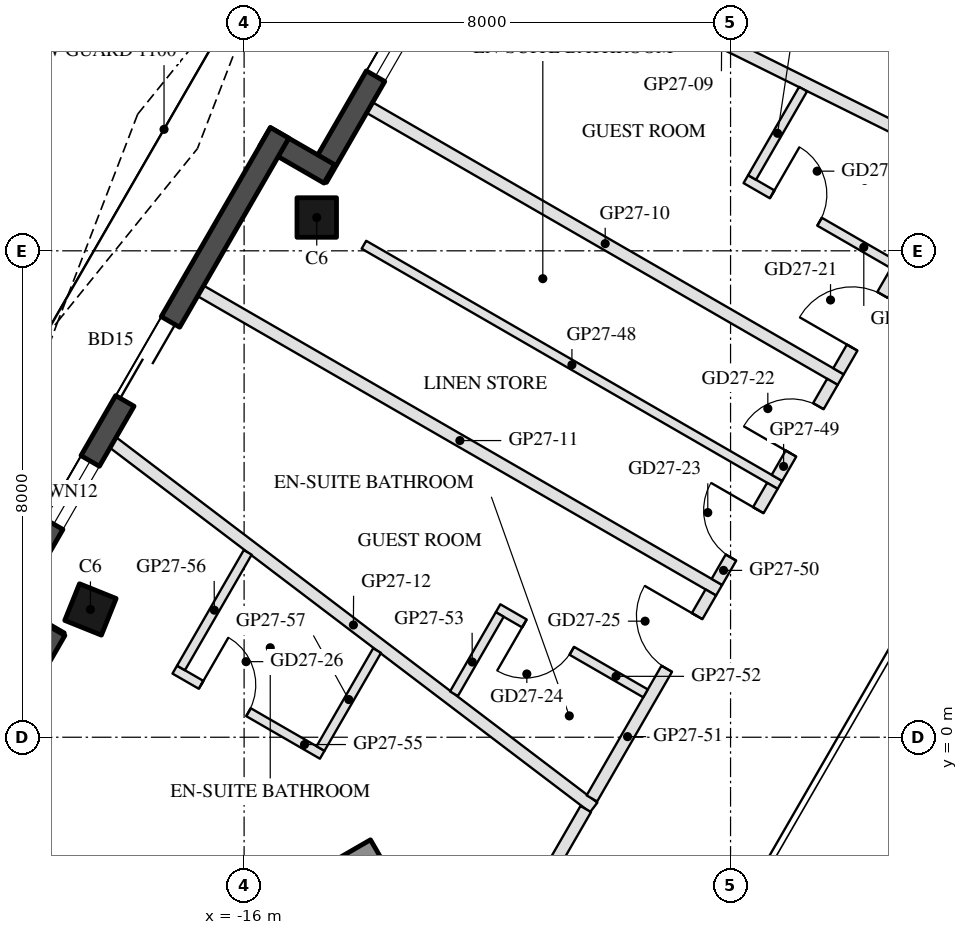
"""IFC4 building model, lengths in metres.
Left out: names, types, materials, properties, quantities, classifications, styles, units other than length and angle.
Written with IfcOpenShell. Run it as: python <this file> out.ifc"""

import sys

from ifc_helpers import new_model, si_unit, direction, frame, frame_2d, origin, origin_2d, place, context, subcontext, project, spatial, rectangle, hollow_rectangle, extrude, boolean, halfspace, element, fill, save


model = new_model("IFC4")
c1 = context("Model", 3, precision=1e-05, world=origin(), true_north=direction((0.0, 1.0)))
c2 = subcontext(c1, "Body", "Model", "MODEL_VIEW")
j1 = project(units=[si_unit("LENGTHUNIT", "METRE"), si_unit("PLANEANGLEUNIT", "RADIAN")], contexts=[c1])
p1 = place(None, origin())
s1 = spatial("IfcSite", under=j1, at=p1, CompositionType="ELEMENT")
p2 = place(p1, origin())
s2 = spatial("IfcBuilding", under=s1, at=p2, CompositionType="ELEMENT")
p3 = place(p2, frame((0.0, 0.0, 276.3)))
s3 = spatial("IfcBuildingStorey", under=s2, at=p3, CompositionType="ELEMENT", Elevation=276.3)
p4 = place(p3, frame((-14.805, 8.548, 0.0), z_axis=(0.131228839908, -0.075723997581, 0.988455799602), x_axis=(-0.499841813697, -0.866116713392, 7.933019e-06)))
e1 = element("IfcColumn", 1, at=p4, inside=s3, PredefinedType="COLUMN", context=c2, shape_type="SweptSolid", body=[
    boolean("DIFFERENCE", boolean("DIFFERENCE", extrude(hollow_rectangle(XDim=0.65, YDim=0.65, WallThickness=0.03, at=origin_2d()), origin(), (0.0, 0.0, 1.0), 3.743), halfspace(frame((0.0, 0.0, 0.037), z_axis=(0.0, 0.0, 1.0), x_axis=(1.0, 0.0, 0.0)), True)), halfspace(frame((0.0, 0.0, 3.706), z_axis=(0.0, 0.0, 1.0), x_axis=(1.0, 0.0, 0.0)), False)),
])
p5 = place(p3, frame((-18.527, 2.102, 0.0), z_axis=(0.16132511193, -0.02291623866, 0.98663521844), x_axis=(-0.495162384909, -0.866667980787, 0.060834395287)))
e2 = element("IfcColumn", 2, at=p5, inside=s3, PredefinedType="COLUMN", context=c2, shape_type="SweptSolid", body=[
    boolean("DIFFERENCE", boolean("DIFFERENCE", extrude(hollow_rectangle(XDim=0.65, YDim=0.65, WallThickness=0.03, at=origin_2d()), origin(), (0.0, 0.0, 1.0), 3.75), halfspace(frame((0.0, 0.0, 0.04), z_axis=(0.0, 0.0, 1.0), x_axis=(1.0, 0.0, 0.0)), True)), halfspace(frame((0.0, 0.0, 3.71), z_axis=(0.0, 0.0, 1.0), x_axis=(1.0, 0.0, 0.0)), False)),
])
p6 = place(p3, frame((-11.655, 14.655, 0.0), z_axis=(0.0, 0.0, 1.0), x_axis=(-0.499995993298, -0.866027717042, 0.0)))
e3 = element("IfcWall", 3, at=p6, inside=s3, PredefinedType="SOLIDWALL", context=c2, shape_type="SweptSolid", body=[
    extrude(rectangle(XDim=6.284, YDim=0.35, at=frame_2d((3.142, 0.0))), origin(), (0.0, 0.0, 1.0), 3.55),
])
p7 = place(p6, frame((1.767, 0.0, 0.0)))
e4 = element("IfcOpeningElement", 4, at=p7, cuts=e3, PredefinedType="OPENING", context=c2, shape_type="SweptSolid", body=[
    extrude(rectangle(XDim=1.5, YDim=2.4, at=frame_2d((0.75, 1.2))), frame((0.0, 0.185, 0.0), z_axis=(0.0, -1.0, 0.0), x_axis=(1.0, 0.0, 0.0)), (0.0, 0.0, 1.0), 0.37),
])
p8 = place(p6, frame((3.566, 0.0, 0.3)))
e5 = element("IfcOpeningElement", 5, at=p8, cuts=e3, PredefinedType="OPENING", context=c2, shape_type="SweptSolid", body=[
    extrude(rectangle(XDim=0.8, YDim=2.65, at=frame_2d((0.4, 1.325))), frame((0.0, 0.185, 0.0), z_axis=(0.0, -1.0, 0.0), x_axis=(1.0, 0.0, 0.0)), (0.0, 0.0, 1.0), 0.37),
])
p9 = place(p3, frame((-14.599, 9.266, 0.0), z_axis=(0.0, 0.0, 1.0), x_axis=(-0.866005645448, 0.500034220881, 0.0)))
e6 = element("IfcWall", 6, at=p9, inside=s3, PredefinedType="SOLIDWALL", context=c2, shape_type="SweptSolid", body=[
    extrude(rectangle(XDim=1.22, YDim=0.35, at=frame_2d((0.61, 0.0))), origin(), (0.0, 0.0, 1.0), 3.55),
])
p10 = place(p3, frame((-15.416, 9.94, 0.0), z_axis=(0.0, 0.0, 1.0), x_axis=(-0.500005190411, -0.866022407078, 0.0)))
e7 = element("IfcWall", 7, at=p10, inside=s3, PredefinedType="SOLIDWALL", context=c2, shape_type="SweptSolid", body=[
    extrude(rectangle(XDim=9.244, YDim=0.35, at=frame_2d((4.622, 0.0))), origin(), (0.0, 0.0, 1.0), 3.55),
])
p11 = place(p10, frame((3.59, 0.0, 0.0)))
e8 = element("IfcOpeningElement", 8, at=p11, cuts=e7, PredefinedType="OPENING", context=c2, shape_type="SweptSolid", body=[
    extrude(rectangle(XDim=1.5, YDim=2.4, at=frame_2d((0.75, 1.2))), frame((0.0, 0.185, 0.0), z_axis=(0.0, -1.0, 0.0), x_axis=(1.0, 0.0, 0.0)), (0.0, 0.0, 1.0), 0.37),
])
p12 = place(p10, frame((6.23, 0.0, 0.3)))
e9 = element("IfcOpeningElement", 9, at=p12, cuts=e7, PredefinedType="OPENING", context=c2, shape_type="SweptSolid", body=[
    extrude(rectangle(XDim=1.2, YDim=2.65, at=frame_2d((0.6, 1.325))), frame((0.0, 0.185, 0.0), z_axis=(0.0, -1.0, 0.0), x_axis=(1.0, 0.0, 0.0)), (0.0, 0.0, 1.0), 0.37),
])
p13 = place(p3, frame((-20.102, 2.174, 0.0), z_axis=(0.0, 0.0, 1.0), x_axis=(0.866092288191, -0.499884134912, 0.0)))
e10 = element("IfcWall", 10, at=p13, inside=s3, PredefinedType="SOLIDWALL", context=c2, shape_type="SweptSolid", body=[
    extrude(rectangle(XDim=1.22, YDim=0.35, at=frame_2d((0.61, 0.0))), origin(), (0.0, 0.0, 1.0), 3.55),
])
p14 = place(p3, frame((-19.099, 1.762, 0.0), z_axis=(0.0, 0.0, 1.0), x_axis=(-0.500012817413, -0.866018003521, 0.0)))
e11 = element("IfcWall", 11, at=p14, inside=s3, PredefinedType="SOLIDWALL", context=c2, shape_type="SweptSolid", body=[
    extrude(rectangle(XDim=6.283, YDim=0.35, at=frame_2d((3.142, 0.0))), origin(), (0.0, 0.0, 1.0), 3.55),
])
p15 = place(p14, frame((0.77, 0.0, 0.0)))
e12 = element("IfcOpeningElement", 12, at=p15, cuts=e11, PredefinedType="OPENING", context=c2, shape_type="SweptSolid", body=[
    extrude(rectangle(XDim=2.4, YDim=2.4, at=frame_2d((1.2, 1.2))), frame((0.0, 0.185, 0.0), z_axis=(0.0, -1.0, 0.0), x_axis=(1.0, 0.0, 0.0)), (0.0, 0.0, 1.0), 0.37),
])
p16 = place(p14, frame((3.47, 0.0, 0.3)))
e13 = element("IfcOpeningElement", 13, at=p16, cuts=e11, PredefinedType="OPENING", context=c2, shape_type="SweptSolid", body=[
    extrude(rectangle(XDim=2.4, YDim=2.65, at=frame_2d((1.2, 1.325))), frame((0.0, 0.185, 0.0), z_axis=(0.0, -1.0, 0.0), x_axis=(1.0, 0.0, 0.0)), (0.0, 0.0, 1.0), 0.37),
])
p17 = place(p3, frame((-13.797, -1.903, 0.0), z_axis=(0.0, 0.0, 1.0), x_axis=(-0.866022106474, -0.500005711065, 0.0)))
e14 = element("IfcWall", 14, at=p17, inside=s3, PredefinedType="SHEAR", context=c2, shape_type="SweptSolid", body=[
    extrude(rectangle(XDim=13.031, YDim=0.5, at=frame_2d((6.516, 0.0))), origin(), (0.0, 0.0, 1.0), 3.5),
])
p18 = place(p3, frame((-12.162, 13.427, 0.0), z_axis=(0.0, 0.0, 1.0), x_axis=(0.895849808174, -0.444356974959, 0.0)))
e15 = element("IfcWall", 15, at=p18, inside=s3, PredefinedType="PARTITIONING", context=c2, shape_type="SweptSolid", body=[
    extrude(rectangle(XDim=8.964, YDim=0.2, at=frame_2d((4.482, 0.0))), origin(), (0.0, 0.0, 1.0), 3.1),
])
p19 = place(p3, frame((-13.935, 10.355, 0.0), z_axis=(0.0, 0.0, 1.0), x_axis=(0.866026066645, -0.499998851889, 0.0)))
e16 = element("IfcWall", 16, at=p19, inside=s3, PredefinedType="PARTITIONING", context=c2, shape_type="SweptSolid", body=[
    extrude(rectangle(XDim=8.946, YDim=0.2, at=frame_2d((4.473, 0.0))), origin(), (0.0, 0.0, 1.0), 3.1),
])
p20 = place(p3, frame((-16.715, 7.341, 0.0), z_axis=(0.0, 0.0, 1.0), x_axis=(0.866024954444, -0.500000778279, 0.0)))
e17 = element("IfcWall", 17, at=p20, inside=s3, PredefinedType="PARTITIONING", context=c2, shape_type="SweptSolid", body=[
    extrude(rectangle(XDim=9.846, YDim=0.2, at=frame_2d((4.923, 0.0))), origin(), (0.0, 0.0, 1.0), 3.1),
])
p21 = place(p3, frame((-18.155, 4.847, 0.0), z_axis=(0.0, 0.0, 1.0), x_axis=(0.796434687651, -0.604724555733, 0.0)))
e18 = element("IfcWall", 18, at=p21, inside=s3, PredefinedType="PARTITIONING", context=c2, shape_type="SweptSolid", body=[
    extrude(rectangle(XDim=9.924, YDim=0.2, at=frame_2d((4.962, 0.0))), origin(), (0.0, 0.0, 1.0), 3.1),
])
p22 = place(p3, frame((-6.225, 6.019, 0.0), z_axis=(0.0, 0.0, 1.0), x_axis=(0.500011000363, 0.866019052629, 0.0)))
e19 = element("IfcWall", 19, at=p22, inside=s3, PredefinedType="PARTITIONING", context=c2, shape_type="SweptSolid", body=[
    extrude(rectangle(XDim=3.906, YDim=0.2, at=frame_2d((1.953, 0.0))), origin(), (0.0, 0.0, 1.0), 3.05),
])
p23 = place(p22, frame((0.45, 0.0, 0.0)))
e20 = element("IfcOpeningElement", 20, at=p23, cuts=e19, PredefinedType="OPENING", context=c2, shape_type="SweptSolid", body=[
    extrude(rectangle(XDim=1.0, YDim=2.1, at=frame_2d((0.5, 1.05))), frame((0.0, 0.11, 0.0), z_axis=(0.0, -1.0, 0.0), x_axis=(1.0, 0.0, 0.0)), (0.0, 0.0, 1.0), 0.22),
])
p24 = place(p3, frame((-7.749, 9.179, 0.0), z_axis=(0.0, 0.0, 1.0), x_axis=(0.866018616679, -0.500011755427, 0.0)))
e21 = element("IfcWall", 21, at=p24, inside=s3, PredefinedType="PARTITIONING", context=c2, shape_type="SweptSolid", body=[
    extrude(rectangle(XDim=2.8, YDim=0.15, at=frame_2d((1.4, 0.0))), origin(), (0.0, 0.0, 1.0), 3.55),
])
p25 = place(p24, frame((0.5, 0.0, 0.0)))
e22 = element("IfcOpeningElement", 22, at=p25, cuts=e21, PredefinedType="OPENING", context=c2, shape_type="SweptSolid", body=[
    extrude(rectangle(XDim=0.9, YDim=2.1, at=frame_2d((0.45, 1.05))), frame((0.0, 0.085, 0.0), z_axis=(0.0, -1.0, 0.0), x_axis=(1.0, 0.0, 0.0)), (0.0, 0.0, 1.0), 0.17),
])
p26 = place(p3, frame((-6.807, 10.659, 0.0), z_axis=(0.0, 0.0, 1.0), x_axis=(-0.500020578564, -0.866013522419, 0.0)))
e23 = element("IfcWall", 23, at=p26, inside=s3, PredefinedType="PARTITIONING", context=c2, shape_type="SweptSolid", body=[
    extrude(rectangle(XDim=1.678, YDim=0.15, at=frame_2d((0.839, 0.0))), origin(), (0.0, 0.0, 1.0), 3.55),
])
p27 = place(p3, frame((-14.03, 8.1, 0.0), z_axis=(0.0, 0.0, 1.0), x_axis=(0.866013180616, -0.500021170551, 0.0)))
e24 = element("IfcWall", 24, at=p27, inside=s3, PredefinedType="PARTITIONING", context=c2, shape_type="SweptSolid", body=[
    extrude(rectangle(XDim=7.9, YDim=0.15, at=frame_2d((3.95, 0.0))), origin(), (0.0, 0.0, 1.0), 3.05),
])
p28 = place(p3, frame((-7.237, 4.265, 0.0), z_axis=(0.0, 0.0, 1.0), x_axis=(0.499923179218, 0.866069751741, 0.0)))
e25 = element("IfcWall", 25, at=p28, inside=s3, PredefinedType="PARTITIONING", context=c2, shape_type="SweptSolid", body=[
    extrude(rectangle(XDim=1.825, YDim=0.2, at=frame_2d((0.913, 0.0))), origin(), (0.0, 0.0, 1.0), 3.05),
])
p29 = place(p28, frame((0.462, 0.0, 0.0)))
e26 = element("IfcOpeningElement", 26, at=p29, cuts=e25, PredefinedType="OPENING", context=c2, shape_type="SweptSolid", body=[
    extrude(rectangle(XDim=0.9, YDim=2.1, at=frame_2d((0.45, 1.05))), frame((0.0, 0.11, 0.0), z_axis=(0.0, -1.0, 0.0), x_axis=(1.0, 0.0, 0.0)), (0.0, 0.0, 1.0), 0.22),
])
p30 = place(p3, frame((-8.225, 2.555, 0.0), z_axis=(0.0, 0.0, 1.0), x_axis=(0.500081442387, 0.865978377894, 0.0)))
e27 = element("IfcWall", 27, at=p30, inside=s3, PredefinedType="PARTITIONING", context=c2, shape_type="SweptSolid", body=[
    extrude(rectangle(XDim=1.825, YDim=0.2, at=frame_2d((0.913, 0.0))), origin(), (0.0, 0.0, 1.0), 3.05),
])
p31 = place(p30, frame((0.462, 0.0, 0.0)))
e28 = element("IfcOpeningElement", 28, at=p31, cuts=e27, PredefinedType="OPENING", context=c2, shape_type="SweptSolid", body=[
    extrude(rectangle(XDim=0.9, YDim=2.1, at=frame_2d((0.45, 1.05))), frame((0.0, 0.11, 0.0), z_axis=(0.0, -1.0, 0.0), x_axis=(1.0, 0.0, 0.0)), (0.0, 0.0, 1.0), 0.22),
])
p32 = place(p3, frame((-10.281, -1.006, 0.0), z_axis=(0.0, 0.0, 1.0), x_axis=(0.499985379744, 0.866033844629, 0.0)))
e29 = element("IfcWall", 29, at=p32, inside=s3, PredefinedType="PARTITIONING", context=c2, shape_type="SweptSolid", body=[
    extrude(rectangle(XDim=3.912, YDim=0.2, at=frame_2d((1.956, 0.0))), origin(), (0.0, 0.0, 1.0), 3.05),
])
p33 = place(p32, frame((2.462, 0.0, 0.0)))
e30 = element("IfcOpeningElement", 30, at=p33, cuts=e29, PredefinedType="OPENING", context=c2, shape_type="SweptSolid", body=[
    extrude(rectangle(XDim=1.0, YDim=2.1, at=frame_2d((0.5, 1.05))), frame((0.0, 0.11, 0.0), z_axis=(0.0, -1.0, 0.0), x_axis=(1.0, 0.0, 0.0)), (0.0, 0.0, 1.0), 0.22),
])
p34 = place(p3, frame((-9.398, 0.722, 0.0), z_axis=(0.0, 0.0, 1.0), x_axis=(-0.866056369097, 0.49994636267, 0.0)))
e31 = element("IfcWall", 31, at=p34, inside=s3, PredefinedType="PARTITIONING", context=c2, shape_type="SweptSolid", body=[
    extrude(rectangle(XDim=2.8, YDim=0.15, at=frame_2d((1.4, 0.0))), origin(), (0.0, 0.0, 1.0), 3.55),
])
p35 = place(p34, frame((1.4, 0.0, 0.0)))
e32 = element("IfcOpeningElement", 32, at=p35, cuts=e31, PredefinedType="OPENING", context=c2, shape_type="SweptSolid", body=[
    extrude(rectangle(XDim=0.9, YDim=2.1, at=frame_2d((0.45, 1.05))), frame((0.0, 0.085, 0.0), z_axis=(0.0, -1.0, 0.0), x_axis=(1.0, 0.0, 0.0)), (0.0, 0.0, 1.0), 0.17),
])
p36 = place(p3, frame((-11.796, 2.019, 0.0), z_axis=(0.0, 0.0, 1.0), x_axis=(-0.499993865112, -0.866028945735, 0.0)))
e33 = element("IfcWall", 33, at=p36, inside=s3, PredefinedType="PARTITIONING", context=c2, shape_type="SweptSolid", body=[
    extrude(rectangle(XDim=1.505, YDim=0.15, at=frame_2d((0.753, 0.0))), origin(), (0.0, 0.0, 1.0), 3.55),
])
p37 = place(p3, frame((-12.269, -4.45, 0.0), z_axis=(0.0, 0.0, 1.0), x_axis=(0.500013576925, 0.866017565001, 0.0)))
e34 = element("IfcWall", 34, at=p37, inside=s3, PredefinedType="PARTITIONING", context=c2, shape_type="SweptSolid", body=[
    extrude(rectangle(XDim=3.775, YDim=0.2, at=frame_2d((1.887, 0.0))), origin(), (0.0, 0.0, 1.0), 3.05),
])
p38 = place(p37, frame((0.8, 0.0, 0.0)))
e35 = element("IfcOpeningElement", 35, at=p38, cuts=e34, PredefinedType="OPENING", context=c2, shape_type="SweptSolid", body=[
    extrude(rectangle(XDim=1.0, YDim=2.1, at=frame_2d((0.5, 1.05))), frame((0.0, 0.11, 0.0), z_axis=(0.0, -1.0, 0.0), x_axis=(1.0, 0.0, 0.0)), (0.0, 0.0, 1.0), 0.22),
])
p39 = place(p3, frame((-17.14, 1.112, 0.0), z_axis=(0.0, 0.0, 1.0), x_axis=(0.866034573852, -0.49998411664, 0.0)))
e36 = element("IfcWall", 36, at=p39, inside=s3, PredefinedType="PARTITIONING", context=c2, shape_type="SweptSolid", body=[
    extrude(rectangle(XDim=2.8, YDim=0.15, at=frame_2d((1.4, 0.0))), origin(), (0.0, 0.0, 1.0), 3.55),
])
p40 = place(p39, frame((0.5, 0.0, 0.0)))
e37 = element("IfcOpeningElement", 37, at=p40, cuts=e36, PredefinedType="OPENING", context=c2, shape_type="SweptSolid", body=[
    extrude(rectangle(XDim=0.9, YDim=2.1, at=frame_2d((0.45, 1.05))), frame((0.0, 0.085, 0.0), z_axis=(0.0, -1.0, 0.0), x_axis=(1.0, 0.0, 0.0)), (0.0, 0.0, 1.0), 0.17),
])
p41 = place(p3, frame((-15.941, 3.04, 0.0), z_axis=(0.0, 0.0, 1.0), x_axis=(-0.500027377864, -0.86600959659, 0.0)))
e38 = element("IfcWall", 38, at=p41, inside=s3, PredefinedType="PARTITIONING", context=c2, shape_type="SweptSolid", body=[
    extrude(rectangle(XDim=2.195, YDim=0.15, at=frame_2d((1.097, 0.0))), origin(), (0.0, 0.0, 1.0), 3.05),
])
p42 = place(p3, frame((-13.813, 1.425, 0.0), z_axis=(0.0, 0.0, 1.0), x_axis=(-0.499980071345, -0.866036909293, 0.0)))
e39 = element("IfcWall", 39, at=p42, inside=s3, PredefinedType="PARTITIONING", context=c2, shape_type="SweptSolid", body=[
    extrude(rectangle(XDim=1.859, YDim=0.15, at=frame_2d((0.93, 0.0))), origin(), (0.0, 0.0, 1.0), 3.05),
])
p43 = place(p8, origin())
e40 = element("IfcWindow", 40, at=p43, inside=s3, PartitioningType="SINGLE_PANEL", PredefinedType="WINDOW", context=c2, shape_type="SweptSolid", body=[
    extrude(rectangle(XDim=0.8, YDim=2.65, at=frame_2d((0.4, 1.325))), frame((0.0, 0.03, 0.0), z_axis=(0.0, -1.0, 0.0), x_axis=(1.0, 0.0, 0.0)), (0.0, 0.0, 1.0), 0.06),
])
fill(e5, e40)
p44 = place(p11, frame((1.5, 0.0, 0.0), z_axis=(0.0, 0.0, 1.0), x_axis=(-1.0, 0.0, 0.0)))
e41 = element("IfcDoor", 41, at=p44, inside=s3, OperationType="SLIDING_TO_LEFT", PredefinedType="DOOR", context=c2, shape_type="SweptSolid", body=[
    extrude(rectangle(XDim=1.5, YDim=2.4, at=frame_2d((0.75, 1.2))), frame((0.0, 0.025, 0.0), z_axis=(0.0, -1.0, 0.0), x_axis=(1.0, 0.0, 0.0)), (0.0, 0.0, 1.0), 0.05),
])
fill(e8, e41)
p45 = place(p12, origin())
e42 = element("IfcWindow", 42, at=p45, inside=s3, PartitioningType="SINGLE_PANEL", PredefinedType="WINDOW", context=c2, shape_type="SweptSolid", body=[
    extrude(rectangle(XDim=1.2, YDim=2.65, at=frame_2d((0.6, 1.325))), frame((0.0, 0.03, 0.0), z_axis=(0.0, -1.0, 0.0), x_axis=(1.0, 0.0, 0.0)), (0.0, 0.0, 1.0), 0.06),
])
fill(e9, e42)
p46 = place(p25, origin())
e43 = element("IfcDoor", 43, at=p46, inside=s3, OperationType="SINGLE_SWING_LEFT", PredefinedType="DOOR", context=c2, shape_type="SweptSolid", body=[
    extrude(rectangle(XDim=0.9, YDim=2.1, at=frame_2d((0.45, 1.05))), frame((0.0, 0.025, 0.0), z_axis=(0.0, -1.0, 0.0), x_axis=(1.0, 0.0, 0.0)), (0.0, 0.0, 1.0), 0.05),
])
fill(e22, e43)
p47 = place(p23, origin())
e44 = element("IfcDoor", 44, at=p47, inside=s3, OperationType="SINGLE_SWING_LEFT", PredefinedType="DOOR", context=c2, shape_type="SweptSolid", body=[
    extrude(rectangle(XDim=1.0, YDim=2.1, at=frame_2d((0.5, 1.05))), frame((0.0, 0.025, 0.0), z_axis=(0.0, -1.0, 0.0), x_axis=(1.0, 0.0, 0.0)), (0.0, 0.0, 1.0), 0.05),
])
fill(e20, e44)
p48 = place(p29, origin())
e45 = element("IfcDoor", 45, at=p48, inside=s3, OperationType="SINGLE_SWING_LEFT", PredefinedType="DOOR", context=c2, shape_type="SweptSolid", body=[
    extrude(rectangle(XDim=0.9, YDim=2.1, at=frame_2d((0.45, 1.05))), frame((0.0, 0.025, 0.0), z_axis=(0.0, -1.0, 0.0), x_axis=(1.0, 0.0, 0.0)), (0.0, 0.0, 1.0), 0.05),
])
fill(e26, e45)
p49 = place(p31, origin())
e46 = element("IfcDoor", 46, at=p49, inside=s3, OperationType="SINGLE_SWING_RIGHT", PredefinedType="DOOR", context=c2, shape_type="SweptSolid", body=[
    extrude(rectangle(XDim=0.9, YDim=2.1, at=frame_2d((0.45, 1.05))), frame((0.0, 0.025, 0.0), z_axis=(0.0, -1.0, 0.0), x_axis=(1.0, 0.0, 0.0)), (0.0, 0.0, 1.0), 0.05),
])
fill(e28, e46)
p50 = place(p35, origin())
e47 = element("IfcDoor", 47, at=p50, inside=s3, OperationType="SINGLE_SWING_RIGHT", PredefinedType="DOOR", context=c2, shape_type="SweptSolid", body=[
    extrude(rectangle(XDim=0.9, YDim=2.1, at=frame_2d((0.45, 1.05))), frame((0.0, 0.025, 0.0), z_axis=(0.0, -1.0, 0.0), x_axis=(1.0, 0.0, 0.0)), (0.0, 0.0, 1.0), 0.05),
])
fill(e32, e47)
p51 = place(p33, origin())
e48 = element("IfcDoor", 48, at=p51, inside=s3, OperationType="SINGLE_SWING_RIGHT", PredefinedType="DOOR", context=c2, shape_type="SweptSolid", body=[
    extrude(rectangle(XDim=1.0, YDim=2.1, at=frame_2d((0.5, 1.05))), frame((0.0, 0.025, 0.0), z_axis=(0.0, -1.0, 0.0), x_axis=(1.0, 0.0, 0.0)), (0.0, 0.0, 1.0), 0.05),
])
fill(e30, e48)
p52 = place(p40, origin())
e49 = element("IfcDoor", 49, at=p52, inside=s3, OperationType="SINGLE_SWING_LEFT", PredefinedType="DOOR", context=c2, shape_type="SweptSolid", body=[
    extrude(rectangle(XDim=0.9, YDim=2.1, at=frame_2d((0.45, 1.05))), frame((0.0, 0.025, 0.0), z_axis=(0.0, -1.0, 0.0), x_axis=(1.0, 0.0, 0.0)), (0.0, 0.0, 1.0), 0.05),
])
fill(e37, e49)
save(model, sys.argv[1])
